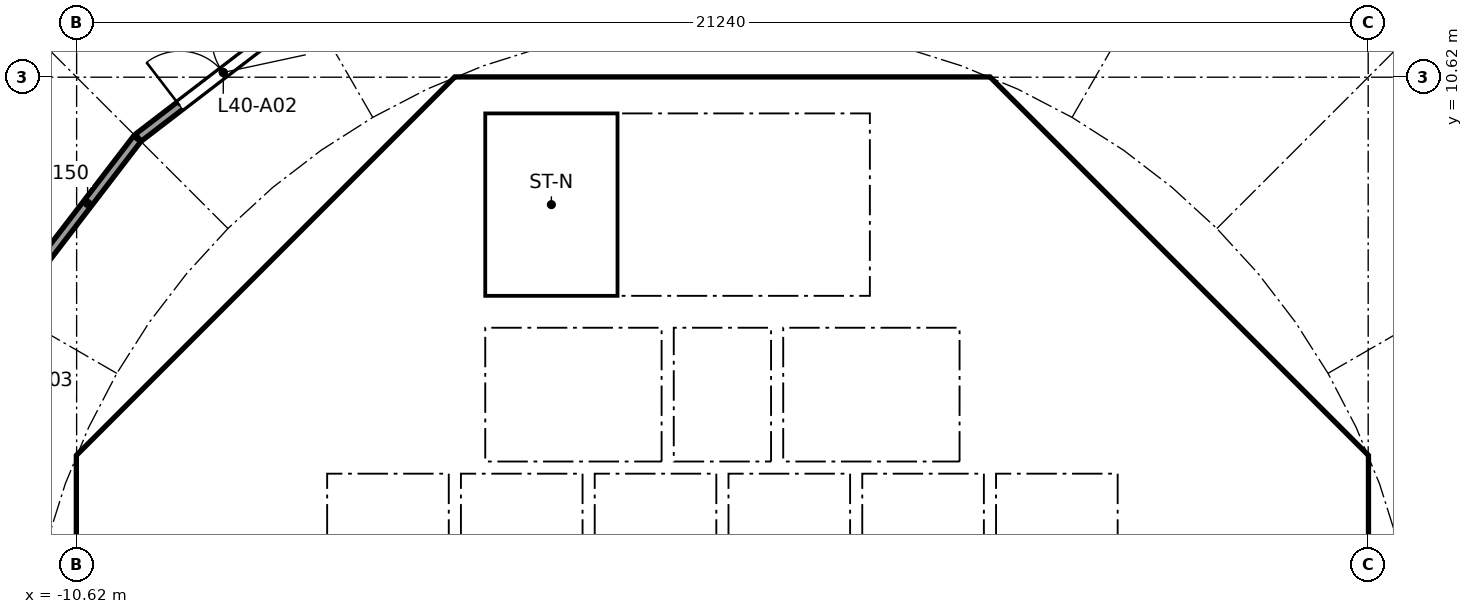
"""IFC4 building model, lengths in metres.
Left out: names, types, materials, properties, quantities, classifications, styles, units other than length and angle.
Written with IfcOpenShell. Run it as: python <this file> out.ifc"""

import sys

from ifc_helpers import new_model, si_unit, direction, frame, frame_2d, origin, place, context, subcontext, project, spatial, polyline, rectangle, outline, extrude, element, fill, save


model = new_model("IFC4")
c1 = context("Model", 3, precision=1e-05, world=origin(), true_north=direction((0.0, 1.0)))
c2 = subcontext(c1, "Body", "Model", "MODEL_VIEW")
j1 = project(units=[si_unit("LENGTHUNIT", "METRE"), si_unit("PLANEANGLEUNIT", "RADIAN")], contexts=[c1])
p1 = place(None, origin())
s1 = spatial("IfcSite", under=j1, at=p1, CompositionType="ELEMENT")
p2 = place(p1, origin())
s2 = spatial("IfcBuilding", under=s1, at=p2, CompositionType="ELEMENT")
p3 = place(p2, frame((0.0, 0.0, 160.3)))
s3 = spatial("IfcBuildingStorey", under=s2, at=p3, CompositionType="ELEMENT", Elevation=160.3)
p4 = place(p3, frame((9.988, 4.613, 0.0), z_axis=(0.0, 0.0, 1.0), x_axis=(-0.707106781187, 0.707106781187, 0.0)))
e1 = element("IfcWall", 1, at=p4, inside=s3, PredefinedType="SHEAR", context=c2, shape_type="SweptSolid", body=[
    extrude(rectangle(XDim=7.602, YDim=0.6, at=frame_2d((3.801, 0.0))), origin(), (0.0, 0.0, 1.0), 5.34),
])
p5 = place(p4, frame((3.201, 0.0, 0.0)))
e2 = element("IfcOpeningElement", 2, at=p5, cuts=e1, PredefinedType="OPENING", context=c2, shape_type="SweptSolid", body=[
    extrude(rectangle(XDim=1.2, YDim=2.1, at=frame_2d((0.6, 1.05))), frame((0.0, 0.31, 0.0), z_axis=(0.0, -1.0, 0.0), x_axis=(1.0, 0.0, 0.0)), (0.0, 0.0, 1.0), 0.62),
])
p6 = place(p3, frame((-4.613, 9.988, 0.0), z_axis=(0.0, 0.0, 1.0), x_axis=(-0.707106781187, -0.707106781187, 0.0)))
e3 = element("IfcWall", 3, at=p6, inside=s3, PredefinedType="SHEAR", context=c2, shape_type="SweptSolid", body=[
    extrude(rectangle(XDim=7.602, YDim=0.6, at=frame_2d((3.801, 0.0))), origin(), (0.0, 0.0, 1.0), 5.34),
])
p7 = place(p6, frame((0.351, 0.0, 0.0)))
e4 = element("IfcOpeningElement", 4, at=p7, cuts=e3, PredefinedType="OPENING", context=c2, shape_type="SweptSolid", body=[
    extrude(rectangle(XDim=1.1, YDim=2.1, at=frame_2d((0.55, 1.05))), frame((0.0, 0.31, 0.0), z_axis=(0.0, -1.0, 0.0), x_axis=(1.0, 0.0, 0.0)), (0.0, 0.0, 1.0), 0.62),
])
p8 = place(p3, frame((-10.325, 3.801, 0.0), z_axis=(0.0, 0.0, 1.0), x_axis=(0.0, -1.0, 0.0)))
e5 = element("IfcWall", 5, at=p8, inside=s3, PredefinedType="SHEAR", context=c2, shape_type="SweptSolid", body=[
    extrude(rectangle(XDim=7.602, YDim=0.6, at=frame_2d((3.801, 0.0))), origin(), (0.0, 0.0, 1.0), 5.34),
])
p9 = place(p8, frame((0.651, 0.0, 0.0)))
e6 = element("IfcOpeningElement", 6, at=p9, cuts=e5, PredefinedType="OPENING", context=c2, shape_type="SweptSolid", body=[
    extrude(rectangle(XDim=1.5, YDim=2.1, at=frame_2d((0.75, 1.05))), frame((0.0, 0.31, 0.0), z_axis=(0.0, -1.0, 0.0), x_axis=(1.0, 0.0, 0.0)), (0.0, 0.0, 1.0), 0.62),
])
p10 = place(p8, frame((5.451, 0.0, 0.0)))
e7 = element("IfcOpeningElement", 7, at=p10, cuts=e5, PredefinedType="OPENING", context=c2, shape_type="SweptSolid", body=[
    extrude(rectangle(XDim=1.5, YDim=2.1, at=frame_2d((0.75, 1.05))), frame((0.0, 0.31, 0.0), z_axis=(0.0, -1.0, 0.0), x_axis=(1.0, 0.0, 0.0)), (0.0, 0.0, 1.0), 0.62),
])
p11 = place(p3, frame((-5.8, 4.3, 0.0), z_axis=(0.0, 0.0, 1.0), x_axis=(0.0, 1.0, 0.0)))
e8 = element("IfcWall", 8, at=p11, inside=s3, PredefinedType="PARTITIONING", context=c2, shape_type="SweptSolid", body=[
    extrude(rectangle(XDim=3.927, YDim=0.15, at=frame_2d((1.963, 0.0))), origin(), (0.0, 0.0, 1.0), 5.34),
])
p12 = place(p11, frame((1.551, 0.0, 0.0)))
e9 = element("IfcOpeningElement", 9, at=p12, cuts=e8, PredefinedType="OPENING", context=c2, shape_type="SweptSolid", body=[
    extrude(rectangle(XDim=0.9, YDim=2.1, at=frame_2d((0.45, 1.05))), frame((0.0, 0.085, 0.0), z_axis=(0.0, -1.0, 0.0), x_axis=(1.0, 0.0, 0.0)), (0.0, 0.0, 1.0), 0.17),
])
p13 = place(p3, frame((4.0, 4.3, 0.0), z_axis=(0.0, 0.0, 1.0), x_axis=(0.0, 1.0, 0.0)))
e10 = element("IfcWall", 10, at=p13, inside=s3, PredefinedType="SOLIDWALL", context=c2, shape_type="SweptSolid", body=[
    extrude(rectangle(XDim=2.2, YDim=0.2, at=frame_2d((1.1, 0.0))), origin(), (0.0, 0.0, 1.0), 5.34),
])
p14 = place(p13, frame((0.55, 0.0, 0.0)))
e11 = element("IfcOpeningElement", 11, at=p14, cuts=e10, PredefinedType="OPENING", context=c2, shape_type="SweptSolid", body=[
    extrude(rectangle(XDim=1.1, YDim=2.1, at=frame_2d((0.55, 1.05))), frame((0.0, 0.11, 0.0), z_axis=(0.0, -1.0, 0.0), x_axis=(1.0, 0.0, 0.0)), (0.0, 0.0, 1.0), 0.22),
])
p15 = place(p3, frame((-4.0, 4.3, 0.0), z_axis=(0.0, 0.0, 1.0), x_axis=(0.0, 1.0, 0.0)))
e12 = element("IfcWall", 12, at=p15, inside=s3, PredefinedType="SOLIDWALL", context=c2, shape_type="SweptSolid", body=[
    extrude(rectangle(XDim=2.2, YDim=0.2, at=frame_2d((1.1, 0.0))), origin(), (0.0, 0.0, 1.0), 5.34),
])
p16 = place(p15, frame((0.55, 0.0, 0.0)))
e13 = element("IfcOpeningElement", 13, at=p16, cuts=e12, PredefinedType="OPENING", context=c2, shape_type="SweptSolid", body=[
    extrude(rectangle(XDim=1.1, YDim=2.1, at=frame_2d((0.55, 1.05))), frame((0.0, 0.11, 0.0), z_axis=(0.0, -1.0, 0.0), x_axis=(1.0, 0.0, 0.0)), (0.0, 0.0, 1.0), 0.22),
])
p17 = place(p3, frame((6.7, 4.0, 0.0), z_axis=(0.0, 0.0, 1.0), x_axis=(1.0, 0.0, 0.0)))
e14 = element("IfcWall", 14, at=p17, inside=s3, PredefinedType="SOLIDWALL", context=c2, shape_type="SweptSolid", body=[
    extrude(rectangle(XDim=3.325, YDim=0.2, at=frame_2d((1.662, 0.0))), origin(), (0.0, 0.0, 1.0), 5.34),
])
p18 = place(p17, frame((1.25, 0.0, 0.0)))
e15 = element("IfcOpeningElement", 15, at=p18, cuts=e14, PredefinedType="OPENING", context=c2, shape_type="SweptSolid", body=[
    extrude(rectangle(XDim=1.1, YDim=2.1, at=frame_2d((0.55, 1.05))), frame((0.0, 0.11, 0.0), z_axis=(0.0, -1.0, 0.0), x_axis=(1.0, 0.0, 0.0)), (0.0, 0.0, 1.0), 0.22),
])
p19 = place(p3, frame((4.0, 7.025, 0.0), z_axis=(0.0, 0.0, 1.0), x_axis=(0.0, 1.0, 0.0)))
e16 = element("IfcWall", 16, at=p19, inside=s3, PredefinedType="SOLIDWALL", context=c2, shape_type="SweptSolid", body=[
    extrude(rectangle(XDim=3.0, YDim=0.2, at=frame_2d((1.5, 0.0))), origin(), (0.0, 0.0, 1.0), 5.34),
])
p20 = place(p19, frame((0.925, 0.0, 0.0)))
e17 = element("IfcOpeningElement", 17, at=p20, cuts=e16, PredefinedType="OPENING", context=c2, shape_type="SweptSolid", body=[
    extrude(rectangle(XDim=1.1, YDim=2.1, at=frame_2d((0.55, 1.05))), frame((0.0, 0.11, 0.0), z_axis=(0.0, -1.0, 0.0), x_axis=(1.0, 0.0, 0.0)), (0.0, 0.0, 1.0), 0.22),
])
p21 = place(p3, origin())
e18 = element("IfcWall", 18, at=p21, inside=s3, PredefinedType="SHEAR", context=c2, shape_type="SweptSolid", body=[
    extrude(outline(polyline([(-10.2, 4.825), (-9.776, 4.401), (-10.025, 4.152), (-10.025, 3.801), (-10.625, 3.801), (-10.625, 4.401), (-10.2, 4.825)])), origin(), (0.0, 0.0, 1.0), 5.34),
])
p22 = place(p3, origin())
e19 = element("IfcWall", 19, at=p22, inside=s3, PredefinedType="SHEAR", context=c2, shape_type="SweptSolid", body=[
    extrude(outline(polyline([(-4.152, 10.025), (-4.401, 9.776), (-4.825, 10.2), (-4.401, 10.625), (4.401, 10.625), (4.825, 10.2), (4.401, 9.776), (4.152, 10.025), (-4.152, 10.025)])), origin(), (0.0, 0.0, 1.0), 5.34),
])
p23 = place(p3, origin())
e20 = element("IfcWall", 20, at=p23, inside=s3, PredefinedType="SHEAR", context=c2, shape_type="SweptSolid", body=[
    extrude(outline(polyline([(9.776, -4.401), (10.025, -4.152), (10.025, -3.801), (10.025, 4.152), (9.776, 4.401), (10.2, 4.825), (10.625, 4.401), (10.625, -4.401), (10.2, -4.825), (9.776, -4.401)])), origin(), (0.0, 0.0, 1.0), 5.34),
])
for number, where, z_axis, x_axis in (
    (21, (-0.9, 4.3, 0.0), (0.0, 0.0, 1.0), (0.0, 1.0, 0.0)),
    (22, (0.9, 4.3, 0.0), (0.0, 0.0, 1.0), (0.0, 1.0, 0.0)),
):
    element("IfcWall", number, at=place(p3, frame(where, z_axis=z_axis, x_axis=x_axis)), inside=s3, PredefinedType="SOLIDWALL", context=c2, shape_type="SweptSolid", body=[
        extrude(rectangle(XDim=2.2, YDim=0.2, at=frame_2d((1.1, 0.0))), origin(), (0.0, 0.0, 1.0), 5.34),
    ])
p24 = place(p3, origin())
e23 = element("IfcWall", 23, at=p24, inside=s3, PredefinedType="SOLIDWALL", context=c2, shape_type="SweptSolid", body=[
    extrude(outline(polyline([(-6.5, 2.1), (-6.7, 2.1), (-6.7, 4.3), (6.7, 4.3), (6.7, 2.1), (6.5, 2.1), (6.5, 4.1), (4.5, 4.1), (4.5, 2.1), (4.3, 2.1), (4.3, 4.1), (2.3, 4.1), (2.3, 2.1), (2.1, 2.1), (2.1, 4.1), (0.1, 4.1), (0.1, 2.1), (-0.1, 2.1), (-0.1, 4.1), (-2.1, 4.1), (-2.1, 2.1), (-2.3, 2.1), (-2.3, 4.1), (-4.3, 4.1), (-4.3, 2.1), (-4.5, 2.1), (-4.5, 4.1), (-6.5, 4.1), (-6.5, 2.1)])), origin(), (0.0, 0.0, 1.0), 5.34),
])
p25 = place(p3, frame((-10.025, 4.0, 0.0), z_axis=(0.0, 0.0, 1.0), x_axis=(1.0, 0.0, 0.0)))
e24 = element("IfcWall", 24, at=p25, inside=s3, PredefinedType="PARTITIONING", context=c2, shape_type="SweptSolid", body=[
    extrude(rectangle(XDim=3.325, YDim=0.2, at=frame_2d((1.662, 0.0))), origin(), (0.0, 0.0, 1.0), 5.34),
])
p26 = place(p3, origin())
e25 = element("IfcWall", 25, at=p26, inside=s3, PredefinedType="SOLIDWALL", context=c2, shape_type="SweptSolid", body=[
    extrude(outline(polyline([(-3.9, 7.025), (-4.1, 7.025), (-4.1, 10.025), (-3.9, 10.025), (-3.9, 7.025)])), origin(), (0.0, 0.0, 1.0), 5.34),
])
p27 = place(p3, origin())
e26 = element("IfcWall", 26, at=p27, inside=s3, PredefinedType="SOLIDWALL", context=c2, shape_type="SweptSolid", body=[
    extrude(outline(polyline([(4.1, 6.5), (-4.1, 6.5), (-4.1, 7.025), (4.1, 7.025), (4.1, 6.5)])), origin(), (0.0, 0.0, 1.0), 5.34),
])
p28 = place(p3, origin())
e27 = element("IfcWall", 27, at=p28, inside=s3, PredefinedType="SOLIDWALL", context=c2, shape_type="SweptSolid", body=[
    extrude(outline(polyline([(7.025, -3.9), (6.7, -3.9), (6.7, 3.9), (7.025, 3.9), (7.025, -3.9)])), origin(), (0.0, 0.0, 1.0), 5.34),
])
p29 = place(p3, frame((-11.255, 7.481, 0.0), z_axis=(0.0, 0.0, 1.0), x_axis=(0.608710767698, 0.793392211512, 0.0)))
e28 = element("IfcWall", 28, at=p29, inside=s3, PredefinedType="PARTITIONING", context=c2, shape_type="SweptSolid", body=[
    extrude(rectangle(XDim=2.68, YDim=0.15, at=frame_2d((1.34, 0.0))), origin(), (0.0, 0.0, 1.0), 5.34),
])
p30 = place(p3, frame((-9.607, 9.624, 0.0), z_axis=(0.0, 0.0, 1.0), x_axis=(0.793372307201, 0.608736710054, 0.0)))
e29 = element("IfcWall", 29, at=p30, inside=s3, PredefinedType="PARTITIONING", context=c2, shape_type="SweptSolid", body=[
    extrude(rectangle(XDim=3.527, YDim=0.15, at=frame_2d((1.763, 0.0))), origin(), (0.0, 0.0, 1.0), 5.34),
])
p31 = place(p30, frame((0.863, 0.0, 0.0)))
e30 = element("IfcOpeningElement", 30, at=p31, cuts=e29, PredefinedType="OPENING", context=c2, shape_type="SweptSolid", body=[
    extrude(rectangle(XDim=1.8, YDim=2.1, at=frame_2d((0.9, 1.05))), frame((0.0, 0.085, 0.0), z_axis=(0.0, -1.0, 0.0), x_axis=(1.0, 0.0, 0.0)), (0.0, 0.0, 1.0), 0.17),
])
p32 = place(p14, origin())
e31 = element("IfcDoor", 31, at=p32, inside=s3, OperationType="DOUBLE_DOOR_SLIDING", PredefinedType="DOOR", context=c2, shape_type="SweptSolid", body=[
    extrude(rectangle(XDim=1.1, YDim=2.1, at=frame_2d((0.55, 1.05))), frame((0.0, 0.025, 0.0), z_axis=(0.0, -1.0, 0.0), x_axis=(1.0, 0.0, 0.0)), (0.0, 0.0, 1.0), 0.05),
])
fill(e11, e31)
p33 = place(p16, origin())
e32 = element("IfcDoor", 32, at=p33, inside=s3, OperationType="DOUBLE_DOOR_SLIDING", PredefinedType="DOOR", context=c2, shape_type="SweptSolid", body=[
    extrude(rectangle(XDim=1.1, YDim=2.1, at=frame_2d((0.55, 1.05))), frame((0.0, 0.025, 0.0), z_axis=(0.0, -1.0, 0.0), x_axis=(1.0, 0.0, 0.0)), (0.0, 0.0, 1.0), 0.05),
])
fill(e13, e32)
p34 = place(p18, frame((1.1, 0.0, 0.0), x_axis=(-1.0, 0.0, 0.0)))
e33 = element("IfcDoor", 33, at=p34, inside=s3, OperationType="SINGLE_SWING_LEFT", PredefinedType="DOOR", context=c2, shape_type="SweptSolid", body=[
    extrude(rectangle(XDim=1.1, YDim=2.1, at=frame_2d((0.55, 1.05))), frame((0.0, 0.025, 0.0), z_axis=(0.0, -1.0, 0.0), x_axis=(1.0, 0.0, 0.0)), (0.0, 0.0, 1.0), 0.05),
])
fill(e15, e33)
p35 = place(p20, origin())
e34 = element("IfcDoor", 34, at=p35, inside=s3, OperationType="SINGLE_SWING_RIGHT", PredefinedType="DOOR", context=c2, shape_type="SweptSolid", body=[
    extrude(rectangle(XDim=1.1, YDim=2.1, at=frame_2d((0.55, 1.05))), frame((0.0, 0.025, 0.0), z_axis=(0.0, -1.0, 0.0), x_axis=(1.0, 0.0, 0.0)), (0.0, 0.0, 1.0), 0.05),
])
fill(e17, e34)
p36 = place(p12, origin())
e35 = element("IfcDoor", 35, at=p36, inside=s3, OperationType="SINGLE_SWING_LEFT", PredefinedType="DOOR", context=c2, shape_type="SweptSolid", body=[
    extrude(rectangle(XDim=0.9, YDim=2.1, at=frame_2d((0.45, 1.05))), frame((0.0, 0.025, 0.0), z_axis=(0.0, -1.0, 0.0), x_axis=(1.0, 0.0, 0.0)), (0.0, 0.0, 1.0), 0.05),
])
fill(e9, e35)
p37 = place(p5, origin())
e36 = element("IfcDoor", 36, at=p37, inside=s3, OperationType="SINGLE_SWING_LEFT", PredefinedType="DOOR", context=c2, shape_type="SweptSolid", body=[
    extrude(rectangle(XDim=1.2, YDim=2.1, at=frame_2d((0.6, 1.05))), frame((0.0, 0.025, 0.0), z_axis=(0.0, -1.0, 0.0), x_axis=(1.0, 0.0, 0.0)), (0.0, 0.0, 1.0), 0.05),
])
fill(e2, e36)
p38 = place(p9, origin())
e37 = element("IfcDoor", 37, at=p38, inside=s3, OperationType="DOUBLE_DOOR_SINGLE_SWING", PredefinedType="DOOR", context=c2, shape_type="SweptSolid", body=[
    extrude(rectangle(XDim=1.5, YDim=2.1, at=frame_2d((0.75, 1.05))), frame((0.0, 0.025, 0.0), z_axis=(0.0, -1.0, 0.0), x_axis=(1.0, 0.0, 0.0)), (0.0, 0.0, 1.0), 0.05),
])
fill(e6, e37)
p39 = place(p7, origin())
e38 = element("IfcDoor", 38, at=p39, inside=s3, OperationType="SINGLE_SWING_LEFT", PredefinedType="DOOR", context=c2, shape_type="SweptSolid", body=[
    extrude(rectangle(XDim=1.1, YDim=2.1, at=frame_2d((0.55, 1.05))), frame((0.0, 0.025, 0.0), z_axis=(0.0, -1.0, 0.0), x_axis=(1.0, 0.0, 0.0)), (0.0, 0.0, 1.0), 0.05),
])
fill(e4, e38)
p40 = place(p31, origin())
e39 = element("IfcDoor", 39, at=p40, inside=s3, OperationType="DOUBLE_DOOR_SINGLE_SWING", PredefinedType="DOOR", context=c2, shape_type="SweptSolid", body=[
    extrude(rectangle(XDim=1.8, YDim=2.1, at=frame_2d((0.9, 1.05))), frame((0.0, 0.025, 0.0), z_axis=(0.0, -1.0, 0.0), x_axis=(1.0, 0.0, 0.0)), (0.0, 0.0, 1.0), 0.05),
])
fill(e30, e39)
save(model, sys.argv[1])
